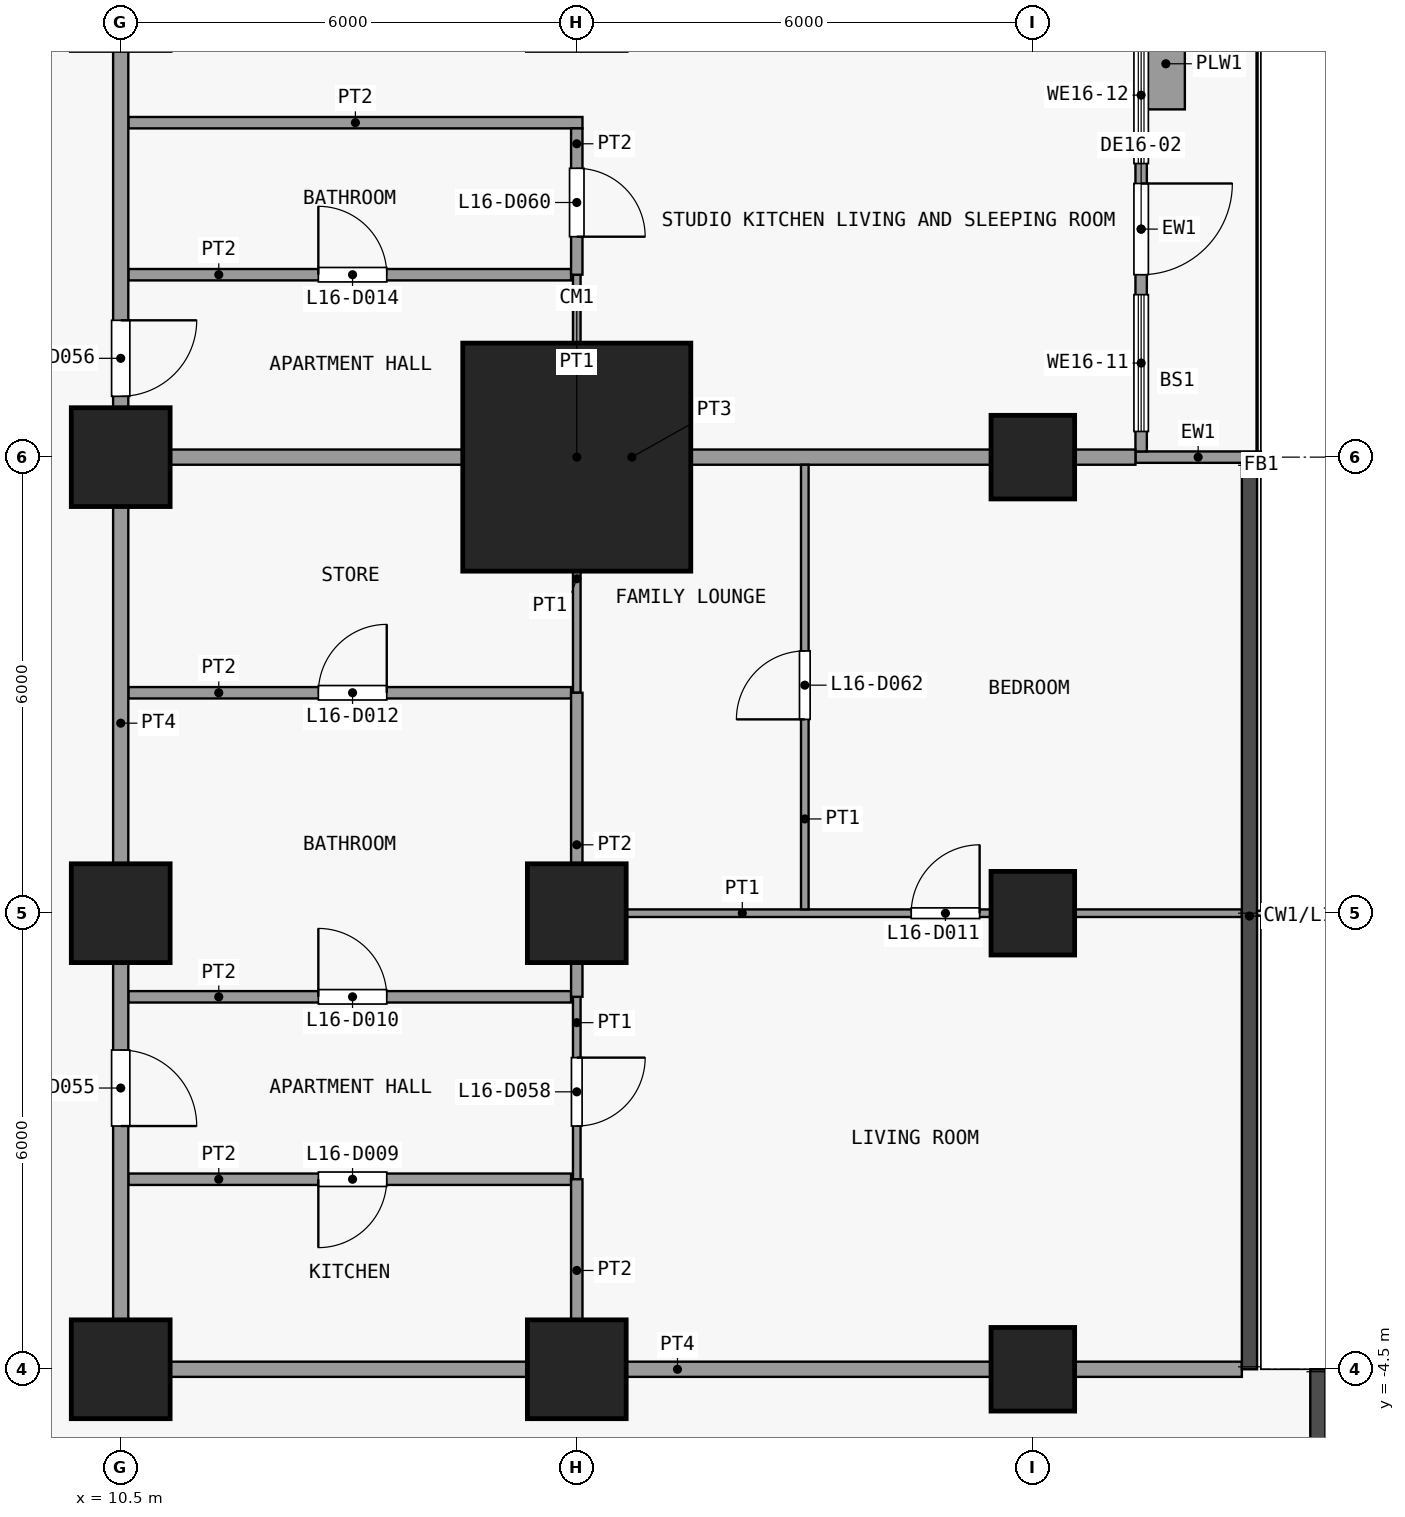
"""IFC4 building model, lengths in metres.
Left out: names, types, materials, properties, quantities, classifications, styles, units other than length and angle.
Written with IfcOpenShell. Run it as: python <this file> out.ifc"""

import sys

from ifc_helpers import new_model, si_unit, direction, frame, frame_2d, origin, origin_2d, place, context, subcontext, project, spatial, rectangle, extrude, element, fill, save


model = new_model("IFC4")
c1 = context("Model", 3, precision=1e-05, world=origin(), true_north=direction((0.0, 1.0)))
c2 = subcontext(c1, "Body", "Model", "MODEL_VIEW")
j1 = project(units=[si_unit("LENGTHUNIT", "METRE"), si_unit("PLANEANGLEUNIT", "RADIAN")], contexts=[c1])
p1 = place(None, origin())
s1 = spatial("IfcSite", under=j1, at=p1, CompositionType="ELEMENT")
p2 = place(p1, origin())
s2 = spatial("IfcBuilding", under=s1, at=p2, CompositionType="ELEMENT")
p3 = place(p2, frame((0.0, 0.0, 68.5)))
s3 = spatial("IfcBuildingStorey", under=s2, at=p3, CompositionType="ELEMENT", Elevation=68.5)
for number, where, z_axis, x_axis in (
    (1, (10.5, -4.5, 0.0), (0.0, 0.0, 1.0), (1.0, 0.0, 0.0)),
    (2, (10.5, 1.5, 0.0), (0.0, 0.0, 1.0), (1.0, 0.0, 0.0)),
    (3, (10.5, 7.5, 0.0), (0.0, 0.0, 1.0), (1.0, 0.0, 0.0)),
    (4, (16.5, -4.5, 0.0), (0.0, 0.0, 1.0), (1.0, 0.0, 0.0)),
    (5, (16.5, 1.5, 0.0), (0.0, 0.0, 1.0), (1.0, 0.0, 0.0)),
):
    element("IfcColumn", number, at=place(p3, frame(where, z_axis=z_axis, x_axis=x_axis)), inside=s3, PredefinedType="COLUMN", context=c2, shape_type="SweptSolid", body=[
        extrude(rectangle(XDim=1.3, YDim=1.3, at=origin_2d()), origin(), (0.0, 0.0, 1.0), 3.6),
    ])
p4 = place(p3, frame((16.5, 7.5, 0.0), z_axis=(0.0, 0.0, 1.0), x_axis=(1.0, 0.0, 0.0)))
e6 = element("IfcColumn", 6, at=p4, inside=s3, PredefinedType="COLUMN", context=c2, shape_type="SweptSolid", body=[
    extrude(rectangle(XDim=3.0, YDim=3.0, at=origin_2d()), origin(), (0.0, 0.0, 1.0), 3.6),
])
for number, where, z_axis, x_axis in (
    (7, (22.5, -4.5, 0.0), (0.0, 0.0, 1.0), (1.0, 0.0, 0.0)),
    (8, (22.5, 1.5, 0.0), (0.0, 0.0, 1.0), (1.0, 0.0, 0.0)),
    (9, (22.5, 7.5, 0.0), (0.0, 0.0, 1.0), (1.0, 0.0, 0.0)),
):
    element("IfcColumn", number, at=place(p3, frame(where, z_axis=z_axis, x_axis=x_axis)), inside=s3, PredefinedType="COLUMN", context=c2, shape_type="SweptSolid", body=[
        extrude(rectangle(XDim=1.1, YDim=1.1, at=origin_2d()), origin(), (0.0, 0.0, 1.0), 3.6),
    ])
p5 = place(p3, frame((23.85, 7.5, 0.0), z_axis=(0.0, 0.0, 1.0), x_axis=(1.0, 0.0, 0.0)))
e10 = element("IfcWall", 10, at=p5, inside=s3, PredefinedType="SOLIDWALL", context=c2, shape_type="SweptSolid", body=[
    extrude(rectangle(XDim=1.65, YDim=0.15, at=frame_2d((0.825, 0.0))), origin(), (0.0, 0.0, 1.0), 3.3),
])
p6 = place(p3, frame((23.925, 13.425, 0.0), z_axis=(0.0, 0.0, 1.0), x_axis=(0.0, -1.0, 0.0)))
e11 = element("IfcWall", 11, at=p6, inside=s3, PredefinedType="SOLIDWALL", context=c2, shape_type="SweptSolid", body=[
    extrude(rectangle(XDim=5.85, YDim=0.15, at=frame_2d((2.925, 0.0))), origin(), (0.0, 0.0, 1.0), 3.3),
])
p7 = place(p6, frame((2.325, 0.0, 0.0)))
e12 = element("IfcOpeningElement", 12, at=p7, cuts=e11, PredefinedType="OPENING", context=c2, shape_type="SweptSolid", body=[
    extrude(rectangle(XDim=1.2, YDim=2.4, at=frame_2d((0.6, 1.2))), frame((0.0, 0.085, 0.0), z_axis=(0.0, -1.0, 0.0), x_axis=(1.0, 0.0, 0.0)), (0.0, 0.0, 1.0), 0.17),
])
p8 = place(p6, frame((3.788, 0.0, 0.9)))
e13 = element("IfcOpeningElement", 13, at=p8, cuts=e11, PredefinedType="OPENING", context=c2, shape_type="SweptSolid", body=[
    extrude(rectangle(XDim=1.8, YDim=2.1, at=frame_2d((0.9, 1.05))), frame((0.0, 0.085, 0.0), z_axis=(0.0, -1.0, 0.0), x_axis=(1.0, 0.0, 0.0)), (0.0, 0.0, 1.0), 0.17),
])
p9 = place(p6, frame((0.262, 0.0, 0.9)))
e14 = element("IfcOpeningElement", 14, at=p9, cuts=e11, PredefinedType="OPENING", context=c2, shape_type="SweptSolid", body=[
    extrude(rectangle(XDim=1.8, YDim=2.1, at=frame_2d((0.9, 1.05))), frame((0.0, 0.085, 0.0), z_axis=(0.0, -1.0, 0.0), x_axis=(1.0, 0.0, 0.0)), (0.0, 0.0, 1.0), 0.17),
])
p10 = place(p3, frame((24.25, 12.075, 0.0), z_axis=(0.0, 0.0, 1.0), x_axis=(0.0, 1.0, 0.0)))
e15 = element("IfcWall", 15, at=p10, inside=s3, PredefinedType="USERDEFINED", context=c2, shape_type="SweptSolid", body=[
    extrude(rectangle(XDim=1.2, YDim=0.5, at=frame_2d((0.6, 0.0))), origin(), (0.0, 0.0, 1.0), 0.9),
])
p11 = place(p3, frame((10.4, -4.5, 0.0), z_axis=(0.0, 0.0, 1.0), x_axis=(1.0, 0.0, 0.0)))
e16 = element("IfcWall", 16, at=p11, inside=s3, PredefinedType="PARTITIONING", context=c2, shape_type="SweptSolid", body=[
    extrude(rectangle(XDim=14.85, YDim=0.2, at=frame_2d((7.425, 0.0))), origin(), (0.0, 0.0, 1.0), 3.3),
])
p12 = place(p3, frame((10.6, -2.0, 0.0), z_axis=(0.0, 0.0, 1.0), x_axis=(1.0, 0.0, 0.0)))
e17 = element("IfcWall", 17, at=p12, inside=s3, PredefinedType="PARTITIONING", context=c2, shape_type="SweptSolid", body=[
    extrude(rectangle(XDim=5.825, YDim=0.15, at=frame_2d((2.913, 0.0))), origin(), (0.0, 0.0, 1.0), 3.3),
])
p13 = place(p12, frame((2.5, 0.0, 0.0)))
e18 = element("IfcOpeningElement", 18, at=p13, cuts=e17, PredefinedType="OPENING", context=c2, shape_type="SweptSolid", body=[
    extrude(rectangle(XDim=0.9, YDim=2.1, at=frame_2d((0.45, 1.05))), frame((0.0, 0.085, 0.0), z_axis=(0.0, -1.0, 0.0), x_axis=(1.0, 0.0, 0.0)), (0.0, 0.0, 1.0), 0.17),
])
p14 = place(p3, frame((10.6, 0.4, 0.0), z_axis=(0.0, 0.0, 1.0), x_axis=(1.0, 0.0, 0.0)))
e19 = element("IfcWall", 19, at=p14, inside=s3, PredefinedType="PARTITIONING", context=c2, shape_type="SweptSolid", body=[
    extrude(rectangle(XDim=5.825, YDim=0.15, at=frame_2d((2.913, 0.0))), origin(), (0.0, 0.0, 1.0), 3.3),
])
p15 = place(p14, frame((2.5, 0.0, 0.0)))
e20 = element("IfcOpeningElement", 20, at=p15, cuts=e19, PredefinedType="OPENING", context=c2, shape_type="SweptSolid", body=[
    extrude(rectangle(XDim=0.9, YDim=2.1, at=frame_2d((0.45, 1.05))), frame((0.0, 0.085, 0.0), z_axis=(0.0, -1.0, 0.0), x_axis=(1.0, 0.0, 0.0)), (0.0, 0.0, 1.0), 0.17),
])
p16 = place(p3, frame((16.575, 1.5, 0.0), z_axis=(0.0, 0.0, 1.0), x_axis=(1.0, 0.0, 0.0)))
e21 = element("IfcWall", 21, at=p16, inside=s3, PredefinedType="PARTITIONING", context=c2, shape_type="SweptSolid", body=[
    extrude(rectangle(XDim=8.675, YDim=0.1, at=frame_2d((4.337, 0.0))), origin(), (0.0, 0.0, 1.0), 3.3),
])
p17 = place(p16, frame((4.325, 0.0, 0.0)))
e22 = element("IfcOpeningElement", 22, at=p17, cuts=e21, PredefinedType="OPENING", context=c2, shape_type="SweptSolid", body=[
    extrude(rectangle(XDim=0.9, YDim=2.1, at=frame_2d((0.45, 1.05))), frame((0.0, 0.06, 0.0), z_axis=(0.0, -1.0, 0.0), x_axis=(1.0, 0.0, 0.0)), (0.0, 0.0, 1.0), 0.12),
])
p18 = place(p3, frame((10.6, 4.4, 0.0), z_axis=(0.0, 0.0, 1.0), x_axis=(1.0, 0.0, 0.0)))
e23 = element("IfcWall", 23, at=p18, inside=s3, PredefinedType="PARTITIONING", context=c2, shape_type="SweptSolid", body=[
    extrude(rectangle(XDim=5.825, YDim=0.15, at=frame_2d((2.913, 0.0))), origin(), (0.0, 0.0, 1.0), 3.3),
])
p19 = place(p18, frame((2.5, 0.0, 0.0)))
e24 = element("IfcOpeningElement", 24, at=p19, cuts=e23, PredefinedType="OPENING", context=c2, shape_type="SweptSolid", body=[
    extrude(rectangle(XDim=0.9, YDim=2.1, at=frame_2d((0.45, 1.05))), frame((0.0, 0.085, 0.0), z_axis=(0.0, -1.0, 0.0), x_axis=(1.0, 0.0, 0.0)), (0.0, 0.0, 1.0), 0.17),
])
p20 = place(p3, frame((10.6, 7.5, 0.0), z_axis=(0.0, 0.0, 1.0), x_axis=(1.0, 0.0, 0.0)))
e25 = element("IfcWall", 25, at=p20, inside=s3, PredefinedType="PARTITIONING", context=c2, shape_type="SweptSolid", body=[
    extrude(rectangle(XDim=13.25, YDim=0.2, at=frame_2d((6.625, 0.0))), origin(), (0.0, 0.0, 1.0), 3.3),
])
p21 = place(p3, frame((10.6, 9.9, 0.0), z_axis=(0.0, 0.0, 1.0), x_axis=(1.0, 0.0, 0.0)))
e26 = element("IfcWall", 26, at=p21, inside=s3, PredefinedType="PARTITIONING", context=c2, shape_type="SweptSolid", body=[
    extrude(rectangle(XDim=5.825, YDim=0.15, at=frame_2d((2.913, 0.0))), origin(), (0.0, 0.0, 1.0), 3.3),
])
p22 = place(p21, frame((2.5, 0.0, 0.0)))
e27 = element("IfcOpeningElement", 27, at=p22, cuts=e26, PredefinedType="OPENING", context=c2, shape_type="SweptSolid", body=[
    extrude(rectangle(XDim=0.9, YDim=2.1, at=frame_2d((0.45, 1.05))), frame((0.0, 0.085, 0.0), z_axis=(0.0, -1.0, 0.0), x_axis=(1.0, 0.0, 0.0)), (0.0, 0.0, 1.0), 0.17),
])
p23 = place(p3, frame((10.6, 11.9, 0.0), z_axis=(0.0, 0.0, 1.0), x_axis=(1.0, 0.0, 0.0)))
e28 = element("IfcWall", 28, at=p23, inside=s3, PredefinedType="PARTITIONING", context=c2, shape_type="SweptSolid", body=[
    extrude(rectangle(XDim=5.975, YDim=0.15, at=frame_2d((2.987, 0.0))), origin(), (0.0, 0.0, 1.0), 3.3),
])
p24 = place(p3, frame((10.5, -4.4, 0.0), z_axis=(0.0, 0.0, 1.0), x_axis=(0.0, 1.0, 0.0)))
e29 = element("IfcWall", 29, at=p24, inside=s3, PredefinedType="PARTITIONING", context=c2, shape_type="SweptSolid", body=[
    extrude(rectangle(XDim=17.8, YDim=0.2, at=frame_2d((8.9, 0.0))), origin(), (0.0, 0.0, 1.0), 3.3),
])
p25 = place(p24, frame((3.1, 0.0, 0.0)))
e30 = element("IfcOpeningElement", 30, at=p25, cuts=e29, PredefinedType="OPENING", context=c2, shape_type="SweptSolid", body=[
    extrude(rectangle(XDim=1.0, YDim=2.1, at=frame_2d((0.5, 1.05))), frame((0.0, 0.11, 0.0), z_axis=(0.0, -1.0, 0.0), x_axis=(1.0, 0.0, 0.0)), (0.0, 0.0, 1.0), 0.22),
])
p26 = place(p24, frame((12.7, 0.0, 0.0)))
e31 = element("IfcOpeningElement", 31, at=p26, cuts=e29, PredefinedType="OPENING", context=c2, shape_type="SweptSolid", body=[
    extrude(rectangle(XDim=1.0, YDim=2.1, at=frame_2d((0.5, 1.05))), frame((0.0, 0.11, 0.0), z_axis=(0.0, -1.0, 0.0), x_axis=(1.0, 0.0, 0.0)), (0.0, 0.0, 1.0), 0.22),
])
p27 = place(p3, frame((16.5, -2.0, 0.0), z_axis=(0.0, 0.0, 1.0), x_axis=(0.0, 1.0, 0.0)))
e32 = element("IfcWall", 32, at=p27, inside=s3, PredefinedType="PARTITIONING", context=c2, shape_type="SweptSolid", body=[
    extrude(rectangle(XDim=2.4, YDim=0.1, at=frame_2d((1.2, 0.0))), origin(), (0.0, 0.0, 1.0), 3.3),
])
p28 = place(p27, frame((0.7, 0.0, 0.0)))
e33 = element("IfcOpeningElement", 33, at=p28, cuts=e32, PredefinedType="OPENING", context=c2, shape_type="SweptSolid", body=[
    extrude(rectangle(XDim=0.9, YDim=2.1, at=frame_2d((0.45, 1.05))), frame((0.0, 0.06, 0.0), z_axis=(0.0, -1.0, 0.0), x_axis=(1.0, 0.0, 0.0)), (0.0, 0.0, 1.0), 0.12),
])
p29 = place(p3, frame((16.5, 4.4, 0.0), z_axis=(0.0, 0.0, 1.0), x_axis=(0.0, 1.0, 0.0)))
e34 = element("IfcWall", 34, at=p29, inside=s3, PredefinedType="PARTITIONING", context=c2, shape_type="SweptSolid", body=[
    extrude(rectangle(XDim=3.0, YDim=0.1, at=frame_2d((1.5, 0.0))), origin(), (0.0, 0.0, 1.0), 3.3),
])
p30 = place(p3, frame((16.5, 7.6, 0.0), z_axis=(0.0, 0.0, 1.0), x_axis=(0.0, 1.0, 0.0)))
e35 = element("IfcWall", 35, at=p30, inside=s3, PredefinedType="PARTITIONING", context=c2, shape_type="SweptSolid", body=[
    extrude(rectangle(XDim=2.3, YDim=0.1, at=frame_2d((1.15, 0.0))), origin(), (0.0, 0.0, 1.0), 3.3),
])
p31 = place(p3, frame((16.5, -4.4, 0.0), z_axis=(0.0, 0.0, 1.0), x_axis=(0.0, 1.0, 0.0)))
e36 = element("IfcWall", 36, at=p31, inside=s3, PredefinedType="PARTITIONING", context=c2, shape_type="SweptSolid", body=[
    extrude(rectangle(XDim=2.4, YDim=0.15, at=frame_2d((1.2, 0.0))), origin(), (0.0, 0.0, 1.0), 3.3),
])
p32 = place(p3, frame((16.5, 0.4, 0.0), z_axis=(0.0, 0.0, 1.0), x_axis=(0.0, 1.0, 0.0)))
e37 = element("IfcWall", 37, at=p32, inside=s3, PredefinedType="PARTITIONING", context=c2, shape_type="SweptSolid", body=[
    extrude(rectangle(XDim=4.0, YDim=0.15, at=frame_2d((2.0, 0.0))), origin(), (0.0, 0.0, 1.0), 3.3),
])
p33 = place(p3, frame((16.5, 9.9, 0.0), z_axis=(0.0, 0.0, 1.0), x_axis=(0.0, 1.0, 0.0)))
e38 = element("IfcWall", 38, at=p33, inside=s3, PredefinedType="PARTITIONING", context=c2, shape_type="SweptSolid", body=[
    extrude(rectangle(XDim=1.925, YDim=0.15, at=frame_2d((0.962, 0.0))), origin(), (0.0, 0.0, 1.0), 3.3),
])
p34 = place(p33, frame((0.5, 0.0, 0.0)))
e39 = element("IfcOpeningElement", 39, at=p34, cuts=e38, PredefinedType="OPENING", context=c2, shape_type="SweptSolid", body=[
    extrude(rectangle(XDim=0.9, YDim=2.1, at=frame_2d((0.45, 1.05))), frame((0.0, 0.085, 0.0), z_axis=(0.0, -1.0, 0.0), x_axis=(1.0, 0.0, 0.0)), (0.0, 0.0, 1.0), 0.17),
])
p35 = place(p3, frame((19.5, 1.55, 0.0), z_axis=(0.0, 0.0, 1.0), x_axis=(0.0, 1.0, 0.0)))
e40 = element("IfcWall", 40, at=p35, inside=s3, PredefinedType="PARTITIONING", context=c2, shape_type="SweptSolid", body=[
    extrude(rectangle(XDim=5.85, YDim=0.1, at=frame_2d((2.925, 0.0))), origin(), (0.0, 0.0, 1.0), 3.3),
])
p36 = place(p35, frame((2.5, 0.0, 0.0)))
e41 = element("IfcOpeningElement", 41, at=p36, cuts=e40, PredefinedType="OPENING", context=c2, shape_type="SweptSolid", body=[
    extrude(rectangle(XDim=0.9, YDim=2.1, at=frame_2d((0.45, 1.05))), frame((0.0, 0.06, 0.0), z_axis=(0.0, -1.0, 0.0), x_axis=(1.0, 0.0, 0.0)), (0.0, 0.0, 1.0), 0.12),
])
p37 = place(p7, origin())
e42 = element("IfcDoor", 42, at=p37, inside=s3, OperationType="SINGLE_SWING_LEFT", PredefinedType="DOOR", context=c2, shape_type="SweptSolid", body=[
    extrude(rectangle(XDim=1.2, YDim=2.4, at=frame_2d((0.6, 1.2))), frame((0.0, 0.025, 0.0), z_axis=(0.0, -1.0, 0.0), x_axis=(1.0, 0.0, 0.0)), (0.0, 0.0, 1.0), 0.05),
])
fill(e12, e42)
p38 = place(p8, origin())
e43 = element("IfcWindow", 43, at=p38, inside=s3, PartitioningType="SINGLE_PANEL", PredefinedType="WINDOW", context=c2, shape_type="SweptSolid", body=[
    extrude(rectangle(XDim=1.8, YDim=2.1, at=frame_2d((0.9, 1.05))), frame((0.0, 0.03, 0.0), z_axis=(0.0, -1.0, 0.0), x_axis=(1.0, 0.0, 0.0)), (0.0, 0.0, 1.0), 0.06),
])
fill(e13, e43)
p39 = place(p9, origin())
e44 = element("IfcWindow", 44, at=p39, inside=s3, PartitioningType="SINGLE_PANEL", PredefinedType="WINDOW", context=c2, shape_type="SweptSolid", body=[
    extrude(rectangle(XDim=1.8, YDim=2.1, at=frame_2d((0.9, 1.05))), frame((0.0, 0.03, 0.0), z_axis=(0.0, -1.0, 0.0), x_axis=(1.0, 0.0, 0.0)), (0.0, 0.0, 1.0), 0.06),
])
fill(e14, e44)
p40 = place(p13, origin())
e45 = element("IfcDoor", 45, at=p40, inside=s3, OperationType="SINGLE_SWING_LEFT", PredefinedType="DOOR", context=c2, shape_type="SweptSolid", body=[
    extrude(rectangle(XDim=0.9, YDim=2.1, at=frame_2d((0.45, 1.05))), frame((0.0, 0.025, 0.0), z_axis=(0.0, -1.0, 0.0), x_axis=(1.0, 0.0, 0.0)), (0.0, 0.0, 1.0), 0.05),
])
fill(e18, e45)
p41 = place(p15, origin())
e46 = element("IfcDoor", 46, at=p41, inside=s3, OperationType="SINGLE_SWING_RIGHT", PredefinedType="DOOR", context=c2, shape_type="SweptSolid", body=[
    extrude(rectangle(XDim=0.9, YDim=2.1, at=frame_2d((0.45, 1.05))), frame((0.0, 0.025, 0.0), z_axis=(0.0, -1.0, 0.0), x_axis=(1.0, 0.0, 0.0)), (0.0, 0.0, 1.0), 0.05),
])
fill(e20, e46)
p42 = place(p17, origin())
e47 = element("IfcDoor", 47, at=p42, inside=s3, OperationType="SINGLE_SWING_LEFT", PredefinedType="DOOR", context=c2, shape_type="SweptSolid", body=[
    extrude(rectangle(XDim=0.9, YDim=2.1, at=frame_2d((0.45, 1.05))), frame((0.0, 0.025, 0.0), z_axis=(0.0, -1.0, 0.0), x_axis=(1.0, 0.0, 0.0)), (0.0, 0.0, 1.0), 0.05),
])
fill(e22, e47)
p43 = place(p19, origin())
e48 = element("IfcDoor", 48, at=p43, inside=s3, OperationType="SINGLE_SWING_LEFT", PredefinedType="DOOR", context=c2, shape_type="SweptSolid", body=[
    extrude(rectangle(XDim=0.9, YDim=2.1, at=frame_2d((0.45, 1.05))), frame((0.0, 0.025, 0.0), z_axis=(0.0, -1.0, 0.0), x_axis=(1.0, 0.0, 0.0)), (0.0, 0.0, 1.0), 0.05),
])
fill(e24, e48)
p44 = place(p22, origin())
e49 = element("IfcDoor", 49, at=p44, inside=s3, OperationType="SINGLE_SWING_RIGHT", PredefinedType="DOOR", context=c2, shape_type="SweptSolid", body=[
    extrude(rectangle(XDim=0.9, YDim=2.1, at=frame_2d((0.45, 1.05))), frame((0.0, 0.025, 0.0), z_axis=(0.0, -1.0, 0.0), x_axis=(1.0, 0.0, 0.0)), (0.0, 0.0, 1.0), 0.05),
])
fill(e27, e49)
p45 = place(p25, origin())
e50 = element("IfcDoor", 50, at=p45, inside=s3, OperationType="SINGLE_SWING_LEFT", PredefinedType="DOOR", context=c2, shape_type="SweptSolid", body=[
    extrude(rectangle(XDim=1.0, YDim=2.1, at=frame_2d((0.5, 1.05))), frame((0.0, 0.025, 0.0), z_axis=(0.0, -1.0, 0.0), x_axis=(1.0, 0.0, 0.0)), (0.0, 0.0, 1.0), 0.05),
])
fill(e30, e50)
p46 = place(p26, origin())
e51 = element("IfcDoor", 51, at=p46, inside=s3, OperationType="SINGLE_SWING_RIGHT", PredefinedType="DOOR", context=c2, shape_type="SweptSolid", body=[
    extrude(rectangle(XDim=1.0, YDim=2.1, at=frame_2d((0.5, 1.05))), frame((0.0, 0.025, 0.0), z_axis=(0.0, -1.0, 0.0), x_axis=(1.0, 0.0, 0.0)), (0.0, 0.0, 1.0), 0.05),
])
fill(e31, e51)
p47 = place(p28, origin())
e52 = element("IfcDoor", 52, at=p47, inside=s3, OperationType="SINGLE_SWING_RIGHT", PredefinedType="DOOR", context=c2, shape_type="SweptSolid", body=[
    extrude(rectangle(XDim=0.9, YDim=2.1, at=frame_2d((0.45, 1.05))), frame((0.0, 0.025, 0.0), z_axis=(0.0, -1.0, 0.0), x_axis=(1.0, 0.0, 0.0)), (0.0, 0.0, 1.0), 0.05),
])
fill(e33, e52)
p48 = place(p34, origin())
e53 = element("IfcDoor", 53, at=p48, inside=s3, OperationType="SINGLE_SWING_LEFT", PredefinedType="DOOR", context=c2, shape_type="SweptSolid", body=[
    extrude(rectangle(XDim=0.9, YDim=2.1, at=frame_2d((0.45, 1.05))), frame((0.0, 0.025, 0.0), z_axis=(0.0, -1.0, 0.0), x_axis=(1.0, 0.0, 0.0)), (0.0, 0.0, 1.0), 0.05),
])
fill(e39, e53)
p49 = place(p36, origin())
e54 = element("IfcDoor", 54, at=p49, inside=s3, OperationType="SINGLE_SWING_RIGHT", PredefinedType="DOOR", context=c2, shape_type="SweptSolid", body=[
    extrude(rectangle(XDim=0.9, YDim=2.1, at=frame_2d((0.45, 1.05))), frame((0.0, 0.025, 0.0), z_axis=(0.0, -1.0, 0.0), x_axis=(1.0, 0.0, 0.0)), (0.0, 0.0, 1.0), 0.05),
])
fill(e41, e54)
save(model, sys.argv[1])
